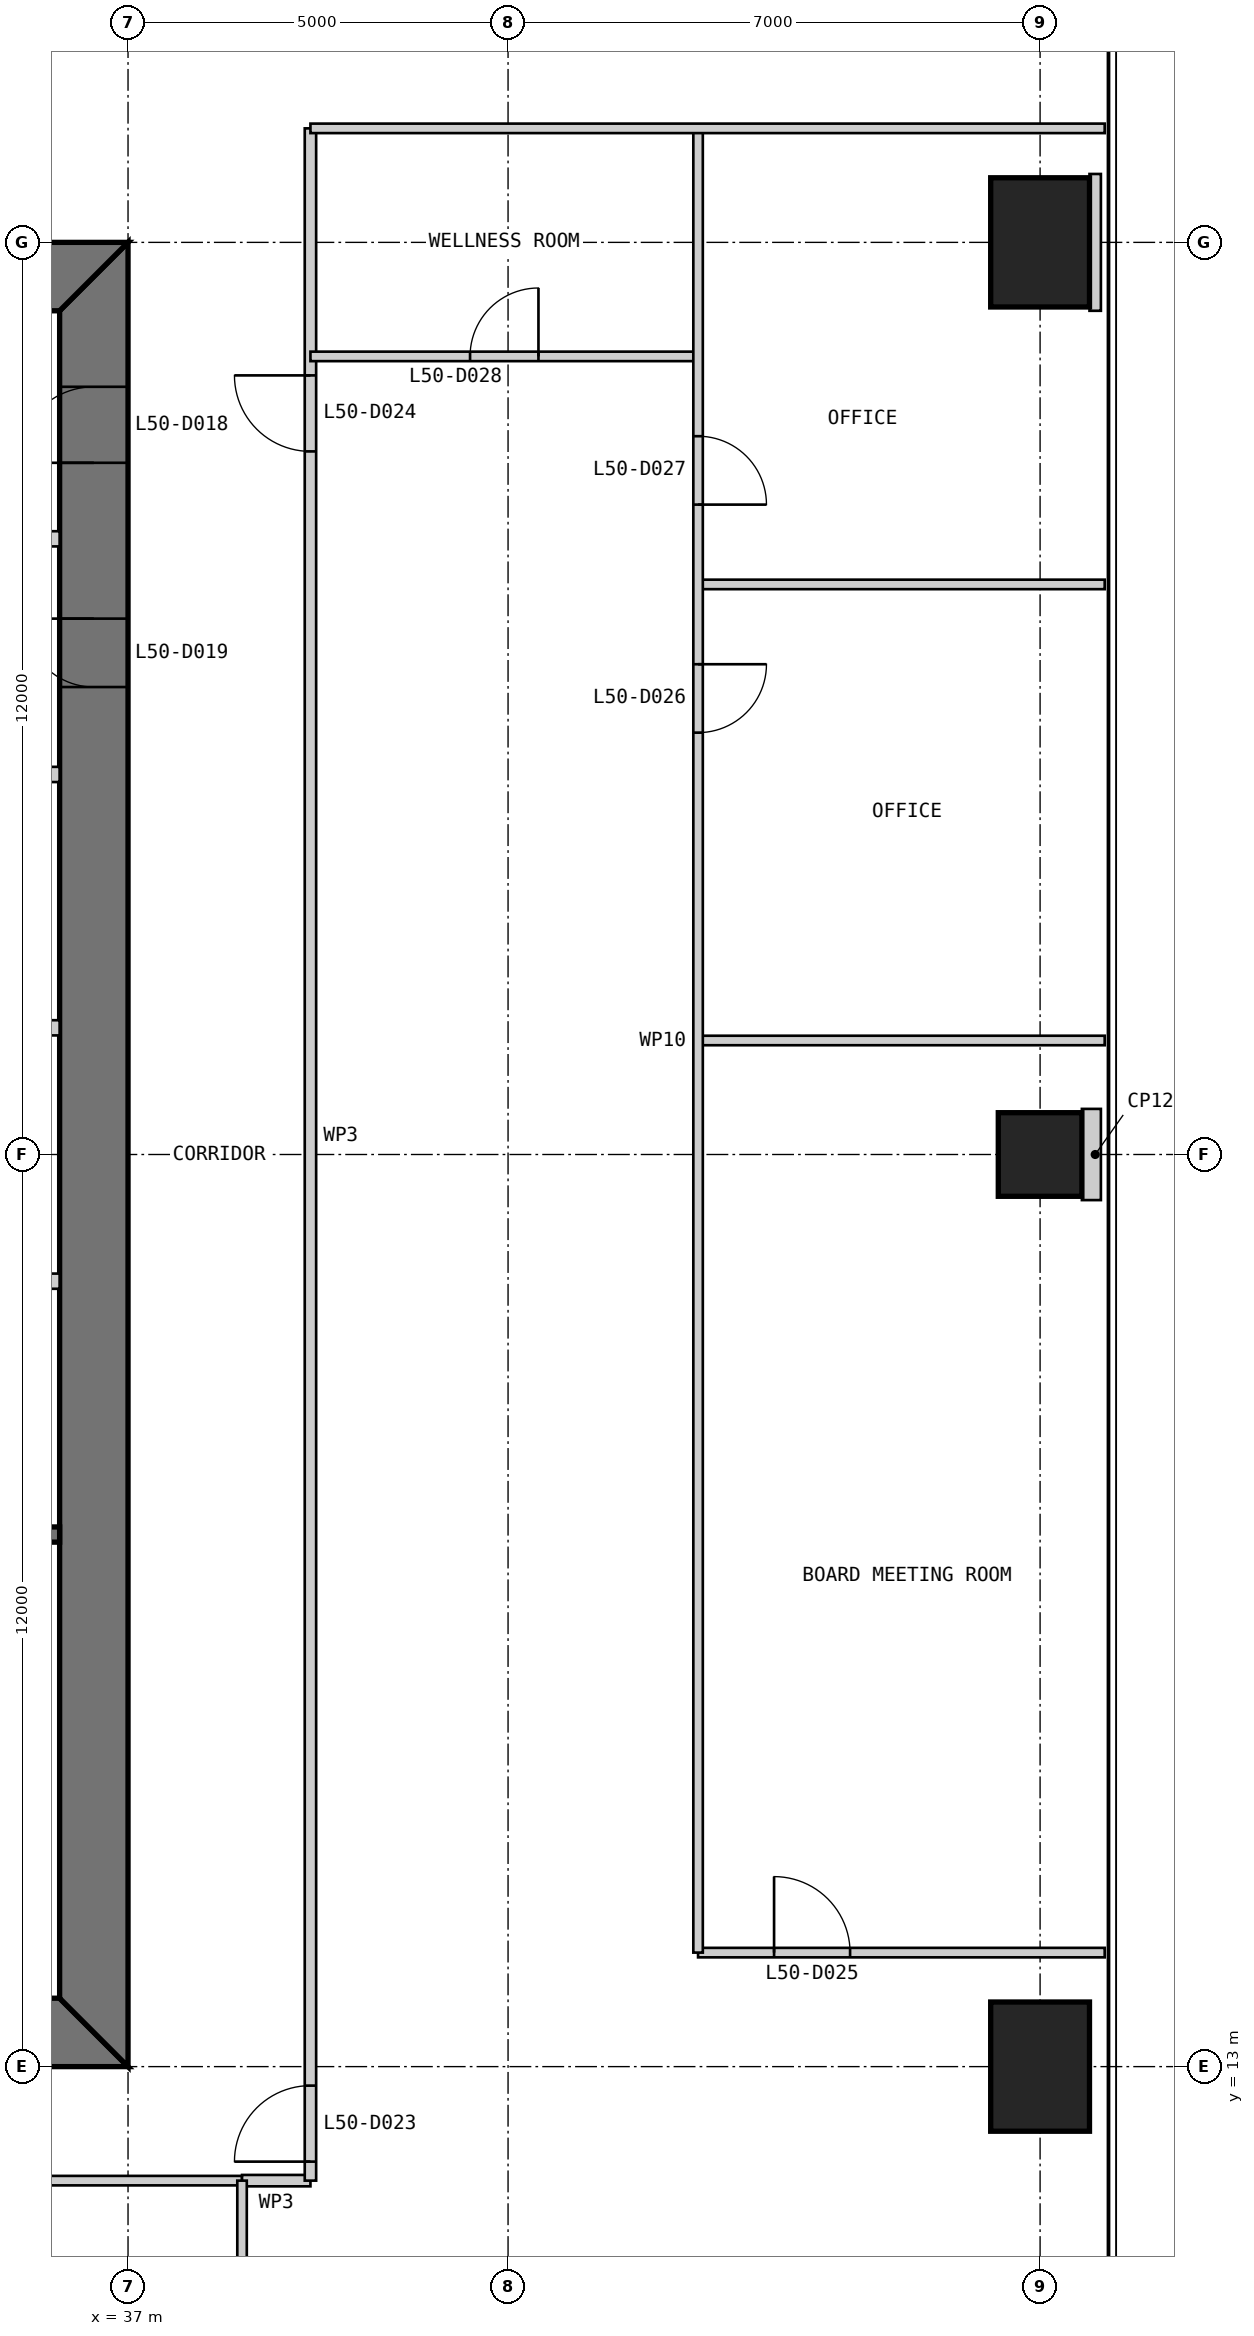
"""IFC4 building model, lengths in metres.
Left out: names, types, materials, properties, quantities, classifications, styles, units other than length and angle.
Written with IfcOpenShell. Run it as: python <this file> out.ifc"""

import sys

from ifc_helpers import new_model, si_unit, direction, frame, frame_2d, origin, origin_2d, place, context, subcontext, project, spatial, polyline, rectangle, outline, extrude, element, fill, save


model = new_model("IFC4")
c1 = context("Model", 3, precision=1e-05, world=origin(), true_north=direction((0.0, 1.0)))
c2 = subcontext(c1, "Body", "Model", "MODEL_VIEW")
j1 = project(units=[si_unit("LENGTHUNIT", "METRE"), si_unit("PLANEANGLEUNIT", "RADIAN")], contexts=[c1])
p1 = place(None, origin())
s1 = spatial("IfcSite", under=j1, at=p1, CompositionType="ELEMENT")
p2 = place(p1, origin())
s2 = spatial("IfcBuilding", under=s1, at=p2, CompositionType="ELEMENT")
p3 = place(p2, frame((0.0, 0.0, 213.8)))
s3 = spatial("IfcBuildingStorey", under=s2, at=p3, CompositionType="ELEMENT", Elevation=213.8)
p4 = place(p3, frame((49.0, 13.0, 0.0), z_axis=(0.0, 0.0, 1.0), x_axis=(1.0, 0.0, 0.0)))
e1 = element("IfcColumn", 1, at=p4, inside=s3, PredefinedType="COLUMN", context=c2, shape_type="SweptSolid", body=[
    extrude(rectangle(XDim=1.3, YDim=1.7, at=origin_2d()), origin(), (0.0, 0.0, 1.0), 4.0),
])
p5 = place(p3, frame((49.0, 25.0, 0.0), z_axis=(0.0, 0.0, 1.0), x_axis=(1.0, 0.0, 0.0)))
e2 = element("IfcColumn", 2, at=p5, inside=s3, PredefinedType="COLUMN", context=c2, shape_type="SweptSolid", body=[
    extrude(rectangle(XDim=1.1, YDim=1.1, at=origin_2d()), origin(), (0.0, 0.0, 1.0), 4.0),
])
p6 = place(p3, frame((49.0, 37.0, 0.0), z_axis=(0.0, 0.0, 1.0), x_axis=(1.0, 0.0, 0.0)))
e3 = element("IfcColumn", 3, at=p6, inside=s3, PredefinedType="COLUMN", context=c2, shape_type="SweptSolid", body=[
    extrude(rectangle(XDim=1.3, YDim=1.7, at=origin_2d()), origin(), (0.0, 0.0, 1.0), 4.0),
])
p7 = place(p3, frame((13.0, 13.45, 0.0), z_axis=(0.0, 0.0, 1.0), x_axis=(1.0, 0.0, 0.0)))
e4 = element("IfcWall", 4, at=p7, inside=s3, PredefinedType="SHEAR", context=c2, shape_type="SweptSolid", body=[
    extrude(outline(polyline([(0.0, -0.45), (24.0, -0.45), (23.1, 0.45), (0.9, 0.45), (0.0, -0.45)])), origin(), (0.0, 0.0, 1.0), 4.0),
])
p8 = place(p7, frame((4.9, 0.0, 0.0)))
e5 = element("IfcOpeningElement", 5, at=p8, cuts=e4, PredefinedType="OPENING", context=c2, shape_type="SweptSolid", body=[
    extrude(rectangle(XDim=1.0, YDim=2.2, at=frame_2d((0.5, 1.1))), frame((0.0, 0.46, 0.0), z_axis=(0.0, -1.0, 0.0), x_axis=(1.0, 0.0, 0.0)), (0.0, 0.0, 1.0), 0.92),
])
p9 = place(p7, frame((8.9, 0.0, 0.0)))
e6 = element("IfcOpeningElement", 6, at=p9, cuts=e4, PredefinedType="OPENING", context=c2, shape_type="SweptSolid", body=[
    extrude(rectangle(XDim=1.1, YDim=2.2, at=frame_2d((0.55, 1.1))), frame((0.0, 0.46, 0.0), z_axis=(0.0, -1.0, 0.0), x_axis=(1.0, 0.0, 0.0)), (0.0, 0.0, 1.0), 0.92),
])
p10 = place(p7, frame((15.05, 0.0, 0.0)))
e7 = element("IfcOpeningElement", 7, at=p10, cuts=e4, PredefinedType="OPENING", context=c2, shape_type="SweptSolid", body=[
    extrude(rectangle(XDim=0.9, YDim=2.2, at=frame_2d((0.45, 1.1))), frame((0.0, 0.46, 0.0), z_axis=(0.0, -1.0, 0.0), x_axis=(1.0, 0.0, 0.0)), (0.0, 0.0, 1.0), 0.92),
])
p11 = place(p7, frame((17.9, 0.0, 0.0)))
e8 = element("IfcOpeningElement", 8, at=p11, cuts=e4, PredefinedType="OPENING", context=c2, shape_type="SweptSolid", body=[
    extrude(rectangle(XDim=1.0, YDim=2.2, at=frame_2d((0.5, 1.1))), frame((0.0, 0.46, 0.0), z_axis=(0.0, -1.0, 0.0), x_axis=(1.0, 0.0, 0.0)), (0.0, 0.0, 1.0), 0.92),
])
p12 = place(p7, frame((21.4, 0.0, 0.0)))
e9 = element("IfcOpeningElement", 9, at=p12, cuts=e4, PredefinedType="OPENING", context=c2, shape_type="SweptSolid", body=[
    extrude(rectangle(XDim=1.0, YDim=2.2, at=frame_2d((0.5, 1.1))), frame((0.0, 0.46, 0.0), z_axis=(0.0, -1.0, 0.0), x_axis=(1.0, 0.0, 0.0)), (0.0, 0.0, 1.0), 0.92),
])
p13 = place(p3, frame((36.55, 13.9, 0.0), z_axis=(0.0, 0.0, 1.0), x_axis=(0.0, 1.0, 0.0)))
e10 = element("IfcWall", 10, at=p13, inside=s3, PredefinedType="SHEAR", context=c2, shape_type="SweptSolid", body=[
    extrude(outline(polyline([(-0.9, -0.45), (23.1, -0.45), (22.2, 0.45), (0.0, 0.45), (-0.9, -0.45)])), origin(), (0.0, 0.0, 1.0), 4.0),
])
p14 = place(p13, frame((20.2, 0.0, 0.0)))
e11 = element("IfcOpeningElement", 11, at=p14, cuts=e10, PredefinedType="OPENING", context=c2, shape_type="SweptSolid", body=[
    extrude(rectangle(XDim=1.0, YDim=2.2, at=frame_2d((0.5, 1.1))), frame((0.0, 0.46, 0.0), z_axis=(0.0, -1.0, 0.0), x_axis=(1.0, 0.0, 0.0)), (0.0, 0.0, 1.0), 0.92),
])
p15 = place(p13, frame((17.25, 0.0, 0.0)))
e12 = element("IfcOpeningElement", 12, at=p15, cuts=e10, PredefinedType="OPENING", context=c2, shape_type="SweptSolid", body=[
    extrude(rectangle(XDim=0.9, YDim=2.2, at=frame_2d((0.45, 1.1))), frame((0.0, 0.46, 0.0), z_axis=(0.0, -1.0, 0.0), x_axis=(1.0, 0.0, 0.0)), (0.0, 0.0, 1.0), 0.92),
])
p16 = place(p3, frame((37.0, 36.55, 0.0), z_axis=(0.0, 0.0, 1.0), x_axis=(-1.0, 0.0, 0.0)))
e13 = element("IfcWall", 13, at=p16, inside=s3, PredefinedType="SHEAR", context=c2, shape_type="SweptSolid", body=[
    extrude(outline(polyline([(0.0, -0.45), (24.0, -0.45), (23.1, 0.45), (0.9, 0.45), (0.0, -0.45)])), origin(), (0.0, 0.0, 1.0), 4.0),
])
p17 = place(p16, frame((4.9, 0.0, 0.0)))
e14 = element("IfcOpeningElement", 14, at=p17, cuts=e13, PredefinedType="OPENING", context=c2, shape_type="SweptSolid", body=[
    extrude(rectangle(XDim=1.0, YDim=2.2, at=frame_2d((0.5, 1.1))), frame((0.0, 0.46, 0.0), z_axis=(0.0, -1.0, 0.0), x_axis=(1.0, 0.0, 0.0)), (0.0, 0.0, 1.0), 0.92),
])
p18 = place(p16, frame((8.9, 0.0, 0.0)))
e15 = element("IfcOpeningElement", 15, at=p18, cuts=e13, PredefinedType="OPENING", context=c2, shape_type="SweptSolid", body=[
    extrude(rectangle(XDim=1.1, YDim=2.2, at=frame_2d((0.55, 1.1))), frame((0.0, 0.46, 0.0), z_axis=(0.0, -1.0, 0.0), x_axis=(1.0, 0.0, 0.0)), (0.0, 0.0, 1.0), 0.92),
])
p19 = place(p16, frame((15.05, 0.0, 0.0)))
e16 = element("IfcOpeningElement", 16, at=p19, cuts=e13, PredefinedType="OPENING", context=c2, shape_type="SweptSolid", body=[
    extrude(rectangle(XDim=0.9, YDim=2.2, at=frame_2d((0.45, 1.1))), frame((0.0, 0.46, 0.0), z_axis=(0.0, -1.0, 0.0), x_axis=(1.0, 0.0, 0.0)), (0.0, 0.0, 1.0), 0.92),
])
p20 = place(p16, frame((17.9, 0.0, 0.0)))
e17 = element("IfcOpeningElement", 17, at=p20, cuts=e13, PredefinedType="OPENING", context=c2, shape_type="SweptSolid", body=[
    extrude(rectangle(XDim=1.0, YDim=2.2, at=frame_2d((0.5, 1.1))), frame((0.0, 0.46, 0.0), z_axis=(0.0, -1.0, 0.0), x_axis=(1.0, 0.0, 0.0)), (0.0, 0.0, 1.0), 0.92),
])
p21 = place(p16, frame((21.4, 0.0, 0.0)))
e18 = element("IfcOpeningElement", 18, at=p21, cuts=e13, PredefinedType="OPENING", context=c2, shape_type="SweptSolid", body=[
    extrude(rectangle(XDim=1.0, YDim=2.2, at=frame_2d((0.5, 1.1))), frame((0.0, 0.46, 0.0), z_axis=(0.0, -1.0, 0.0), x_axis=(1.0, 0.0, 0.0)), (0.0, 0.0, 1.0), 0.92),
])
p22 = place(p3, frame((20.3, 20.0, 0.0), z_axis=(0.0, 0.0, 1.0), x_axis=(1.0, 0.0, 0.0)))
e19 = element("IfcWall", 19, at=p22, inside=s3, PredefinedType="SOLIDWALL", context=c2, shape_type="SweptSolid", body=[
    extrude(rectangle(XDim=15.8, YDim=0.2, at=frame_2d((7.9, 0.0))), origin(), (0.0, 0.0, 1.0), 3.8),
])
for number, where, z_axis, x_axis in (
    (20, (36.1, 30.0, 0.0), (0.0, 0.0, 1.0), (-1.0, 0.0, 0.0)),
    (21, (36.1, 26.667, 0.0), (0.0, 0.0, 1.0), (-1.0, 0.0, 0.0)),
    (22, (36.1, 23.333, 0.0), (0.0, 0.0, 1.0), (-1.0, 0.0, 0.0)),
    (23, (36.1, 33.1, 0.0), (0.0, 0.0, 1.0), (-1.0, 0.0, 0.0)),
):
    element("IfcWall", number, at=place(p3, frame(where, z_axis=z_axis, x_axis=x_axis)), inside=s3, PredefinedType="PARTITIONING", context=c2, shape_type="SweptSolid", body=[
        extrude(rectangle(XDim=2.8, YDim=0.2, at=frame_2d((1.4, 0.0))), origin(), (0.0, 0.0, 1.0), 3.8),
    ])
p23 = place(p3, frame((35.5, 11.5, 0.0), z_axis=(0.0, 0.0, 1.0), x_axis=(1.0, 0.0, 0.0)))
e24 = element("IfcWall", 24, at=p23, inside=s3, PredefinedType="PARTITIONING", context=c2, shape_type="SweptSolid", body=[
    extrude(rectangle(XDim=3.0, YDim=0.125, at=frame_2d((1.5, 0.0))), origin(), (0.0, 0.0, 1.0), 3.85),
])
p24 = place(p3, frame((38.5, 11.5, 0.0), z_axis=(0.0, 0.0, 1.0), x_axis=(1.0, 0.0, 0.0)))
e25 = element("IfcWall", 25, at=p24, inside=s3, PredefinedType="PARTITIONING", context=c2, shape_type="SweptSolid", body=[
    extrude(rectangle(XDim=0.9, YDim=0.15, at=frame_2d((0.45, 0.0))), origin(), (0.0, 0.0, 1.0), 3.85),
])
p25 = place(p3, frame((39.4, 11.5, 0.0), z_axis=(0.0, 0.0, 1.0), x_axis=(0.0, 1.0, 0.0)))
e26 = element("IfcWall", 26, at=p25, inside=s3, PredefinedType="PARTITIONING", context=c2, shape_type="SweptSolid", body=[
    extrude(rectangle(XDim=27.0, YDim=0.15, at=frame_2d((13.5, 0.0))), origin(), (0.0, 0.0, 1.0), 3.85),
])
p26 = place(p25, frame((0.25, 0.0, 0.0)))
e27 = element("IfcOpeningElement", 27, at=p26, cuts=e26, PredefinedType="OPENING", context=c2, shape_type="SweptSolid", body=[
    extrude(rectangle(XDim=1.0, YDim=2.2, at=frame_2d((0.5, 1.1))), frame((0.0, 0.085, 0.0), z_axis=(0.0, -1.0, 0.0), x_axis=(1.0, 0.0, 0.0)), (0.0, 0.0, 1.0), 0.17),
])
p27 = place(p25, frame((22.75, 0.0, 0.0)))
e28 = element("IfcOpeningElement", 28, at=p27, cuts=e26, PredefinedType="OPENING", context=c2, shape_type="SweptSolid", body=[
    extrude(rectangle(XDim=1.0, YDim=2.2, at=frame_2d((0.5, 1.1))), frame((0.0, 0.085, 0.0), z_axis=(0.0, -1.0, 0.0), x_axis=(1.0, 0.0, 0.0)), (0.0, 0.0, 1.0), 0.17),
])
p28 = place(p3, frame((38.5, 0.15, 0.0), z_axis=(0.0, 0.0, 1.0), x_axis=(0.0, 1.0, 0.0)))
e29 = element("IfcWall", 29, at=p28, inside=s3, PredefinedType="PARTITIONING", context=c2, shape_type="SweptSolid", body=[
    extrude(rectangle(XDim=11.35, YDim=0.125, at=frame_2d((5.675, 0.0))), origin(), (0.0, 0.0, 1.0), 3.85),
])
p29 = place(p3, frame((49.85, 14.5, 0.0), z_axis=(0.0, 0.0, 1.0), x_axis=(-1.0, 0.0, 0.0)))
e30 = element("IfcWall", 30, at=p29, inside=s3, PredefinedType="PARTITIONING", context=c2, shape_type="SweptSolid", body=[
    extrude(rectangle(XDim=5.35, YDim=0.125, at=frame_2d((2.675, 0.0))), origin(), (0.0, 0.0, 1.0), 3.85),
])
p30 = place(p29, frame((3.35, 0.0, 0.0)))
e31 = element("IfcOpeningElement", 31, at=p30, cuts=e30, PredefinedType="OPENING", context=c2, shape_type="SweptSolid", body=[
    extrude(rectangle(XDim=1.0, YDim=2.2, at=frame_2d((0.5, 1.1))), frame((0.0, 0.073, 0.0), z_axis=(0.0, -1.0, 0.0), x_axis=(1.0, 0.0, 0.0)), (0.0, 0.0, 1.0), 0.145),
])
for number, where, z_axis, x_axis in (
    (32, (49.85, 26.5, 0.0), (0.0, 0.0, 1.0), (-1.0, 0.0, 0.0)),
    (33, (49.85, 32.5, 0.0), (0.0, 0.0, 1.0), (-1.0, 0.0, 0.0)),
):
    element("IfcWall", number, at=place(p3, frame(where, z_axis=z_axis, x_axis=x_axis)), inside=s3, PredefinedType="PARTITIONING", context=c2, shape_type="SweptSolid", body=[
        extrude(rectangle(XDim=5.35, YDim=0.125, at=frame_2d((2.675, 0.0))), origin(), (0.0, 0.0, 1.0), 3.85),
    ])
p31 = place(p3, frame((44.5, 35.5, 0.0), z_axis=(0.0, 0.0, 1.0), x_axis=(-1.0, 0.0, 0.0)))
e34 = element("IfcWall", 34, at=p31, inside=s3, PredefinedType="PARTITIONING", context=c2, shape_type="SweptSolid", body=[
    extrude(rectangle(XDim=5.1, YDim=0.125, at=frame_2d((2.55, 0.0))), origin(), (0.0, 0.0, 1.0), 3.85),
])
p32 = place(p31, frame((2.1, 0.0, 0.0)))
e35 = element("IfcOpeningElement", 35, at=p32, cuts=e34, PredefinedType="OPENING", context=c2, shape_type="SweptSolid", body=[
    extrude(rectangle(XDim=0.9, YDim=2.2, at=frame_2d((0.45, 1.1))), frame((0.0, 0.073, 0.0), z_axis=(0.0, -1.0, 0.0), x_axis=(1.0, 0.0, 0.0)), (0.0, 0.0, 1.0), 0.145),
])
p33 = place(p3, frame((44.5, 14.5, 0.0), z_axis=(0.0, 0.0, 1.0), x_axis=(0.0, 1.0, 0.0)))
e36 = element("IfcWall", 36, at=p33, inside=s3, PredefinedType="PARTITIONING", context=c2, shape_type="SweptSolid", body=[
    extrude(rectangle(XDim=24.0, YDim=0.125, at=frame_2d((12.0, 0.0))), origin(), (0.0, 0.0, 1.0), 3.85),
])
p34 = place(p33, frame((16.05, 0.0, 0.0)))
e37 = element("IfcOpeningElement", 37, at=p34, cuts=e36, PredefinedType="OPENING", context=c2, shape_type="SweptSolid", body=[
    extrude(rectangle(XDim=0.9, YDim=2.2, at=frame_2d((0.45, 1.1))), frame((0.0, 0.073, 0.0), z_axis=(0.0, -1.0, 0.0), x_axis=(1.0, 0.0, 0.0)), (0.0, 0.0, 1.0), 0.145),
])
p35 = place(p33, frame((19.05, 0.0, 0.0)))
e38 = element("IfcOpeningElement", 38, at=p35, cuts=e36, PredefinedType="OPENING", context=c2, shape_type="SweptSolid", body=[
    extrude(rectangle(XDim=0.9, YDim=2.2, at=frame_2d((0.45, 1.1))), frame((0.0, 0.073, 0.0), z_axis=(0.0, -1.0, 0.0), x_axis=(1.0, 0.0, 0.0)), (0.0, 0.0, 1.0), 0.145),
])
p36 = place(p3, frame((49.85, 38.5, 0.0), z_axis=(0.0, 0.0, 1.0), x_axis=(-1.0, 0.0, 0.0)))
e39 = element("IfcWall", 39, at=p36, inside=s3, PredefinedType="PARTITIONING", context=c2, shape_type="SweptSolid", body=[
    extrude(rectangle(XDim=10.45, YDim=0.125, at=frame_2d((5.225, 0.0))), origin(), (0.0, 0.0, 1.0), 3.85),
])
p37 = place(p3, frame((49.8, 25.0, 0.0), z_axis=(0.0, 0.0, 1.0), x_axis=(-1.0, 0.0, 0.0)))
e40 = element("IfcWall", 40, at=p37, inside=s3, PredefinedType="PARTITIONING", context=c2, shape_type="SweptSolid", body=[
    extrude(rectangle(XDim=0.25, YDim=1.2, at=frame_2d((0.125, 0.0))), origin(), (0.0, 0.0, 1.0), 3.85),
])
p38 = place(p3, frame((49.8, 37.0, 0.0), z_axis=(0.0, 0.0, 1.0), x_axis=(-1.0, 0.0, 0.0)))
e41 = element("IfcWall", 41, at=p38, inside=s3, PredefinedType="PARTITIONING", context=c2, shape_type="SweptSolid", body=[
    extrude(rectangle(XDim=0.15, YDim=1.8, at=frame_2d((0.075, 0.0))), origin(), (0.0, 0.0, 1.0), 3.85),
])
p39 = place(p14, origin())
e42 = element("IfcDoor", 42, at=p39, inside=s3, OperationType="SINGLE_SWING_LEFT", PredefinedType="DOOR", context=c2, shape_type="SweptSolid", body=[
    extrude(rectangle(XDim=1.0, YDim=2.2, at=frame_2d((0.5, 1.1))), frame((0.0, 0.025, 0.0), z_axis=(0.0, -1.0, 0.0), x_axis=(1.0, 0.0, 0.0)), (0.0, 0.0, 1.0), 0.05),
    extrude(outline(polyline([(0.0, 0.0), (0.04, 0.0), (0.04, 2.16), (0.96, 2.16), (0.96, 0.0), (1.0, 0.0), (1.0, 2.2), (0.0, 2.2), (0.0, 0.0)])), frame((0.0, 0.3, 0.0), z_axis=(0.0, -1.0, 0.0), x_axis=(1.0, 0.0, 0.0)), (0.0, 0.0, 1.0), 0.6),
])
fill(e11, e42)
p40 = place(p15, origin())
e43 = element("IfcDoor", 43, at=p40, inside=s3, OperationType="SINGLE_SWING_RIGHT", PredefinedType="DOOR", context=c2, shape_type="SweptSolid", body=[
    extrude(rectangle(XDim=0.9, YDim=2.2, at=frame_2d((0.45, 1.1))), frame((0.0, 0.025, 0.0), z_axis=(0.0, -1.0, 0.0), x_axis=(1.0, 0.0, 0.0)), (0.0, 0.0, 1.0), 0.05),
    extrude(outline(polyline([(0.0, 0.0), (0.04, 0.0), (0.04, 2.16), (0.86, 2.16), (0.86, 0.0), (0.9, 0.0), (0.9, 2.2), (0.0, 2.2), (0.0, 0.0)])), frame((0.0, 0.3, 0.0), z_axis=(0.0, -1.0, 0.0), x_axis=(1.0, 0.0, 0.0)), (0.0, 0.0, 1.0), 0.6),
])
fill(e12, e43)
p41 = place(p26, origin())
e44 = element("IfcDoor", 44, at=p41, inside=s3, OperationType="SINGLE_SWING_LEFT", PredefinedType="DOOR", context=c2, shape_type="SweptSolid", body=[
    extrude(rectangle(XDim=1.0, YDim=2.2, at=frame_2d((0.5, 1.1))), frame((0.0, 0.025, 0.0), z_axis=(0.0, -1.0, 0.0), x_axis=(1.0, 0.0, 0.0)), (0.0, 0.0, 1.0), 0.05),
])
fill(e27, e44)
p42 = place(p27, origin())
e45 = element("IfcDoor", 45, at=p42, inside=s3, OperationType="SINGLE_SWING_RIGHT", PredefinedType="DOOR", context=c2, shape_type="SweptSolid", body=[
    extrude(rectangle(XDim=1.0, YDim=2.2, at=frame_2d((0.5, 1.1))), frame((0.0, 0.025, 0.0), z_axis=(0.0, -1.0, 0.0), x_axis=(1.0, 0.0, 0.0)), (0.0, 0.0, 1.0), 0.05),
])
fill(e28, e45)
p43 = place(p30, frame((1.0, 0.0, 0.0), z_axis=(0.0, 0.0, 1.0), x_axis=(-1.0, 0.0, 0.0)))
e46 = element("IfcDoor", 46, at=p43, inside=s3, OperationType="SINGLE_SWING_LEFT", PredefinedType="DOOR", context=c2, shape_type="SweptSolid", body=[
    extrude(rectangle(XDim=1.0, YDim=2.2, at=frame_2d((0.5, 1.1))), frame((0.0, 0.025, 0.0), z_axis=(0.0, -1.0, 0.0), x_axis=(1.0, 0.0, 0.0)), (0.0, 0.0, 1.0), 0.05),
])
fill(e31, e46)
p44 = place(p34, frame((0.9, 0.0, 0.0), z_axis=(0.0, 0.0, 1.0), x_axis=(-1.0, 0.0, 0.0)))
e47 = element("IfcDoor", 47, at=p44, inside=s3, OperationType="SINGLE_SWING_LEFT", PredefinedType="DOOR", context=c2, shape_type="SweptSolid", body=[
    extrude(rectangle(XDim=0.9, YDim=2.2, at=frame_2d((0.45, 1.1))), frame((0.0, 0.025, 0.0), z_axis=(0.0, -1.0, 0.0), x_axis=(1.0, 0.0, 0.0)), (0.0, 0.0, 1.0), 0.05),
])
fill(e37, e47)
p45 = place(p35, frame((0.9, 0.0, 0.0), z_axis=(0.0, 0.0, 1.0), x_axis=(-1.0, 0.0, 0.0)))
e48 = element("IfcDoor", 48, at=p45, inside=s3, OperationType="SINGLE_SWING_RIGHT", PredefinedType="DOOR", context=c2, shape_type="SweptSolid", body=[
    extrude(rectangle(XDim=0.9, YDim=2.2, at=frame_2d((0.45, 1.1))), frame((0.0, 0.025, 0.0), z_axis=(0.0, -1.0, 0.0), x_axis=(1.0, 0.0, 0.0)), (0.0, 0.0, 1.0), 0.05),
])
fill(e38, e48)
p46 = place(p32, frame((0.9, 0.0, 0.0), z_axis=(0.0, 0.0, 1.0), x_axis=(-1.0, 0.0, 0.0)))
e49 = element("IfcDoor", 49, at=p46, inside=s3, OperationType="SINGLE_SWING_RIGHT", PredefinedType="DOOR", context=c2, shape_type="SweptSolid", body=[
    extrude(rectangle(XDim=0.9, YDim=2.2, at=frame_2d((0.45, 1.1))), frame((0.0, 0.025, 0.0), z_axis=(0.0, -1.0, 0.0), x_axis=(1.0, 0.0, 0.0)), (0.0, 0.0, 1.0), 0.05),
])
fill(e35, e49)
save(model, sys.argv[1])
